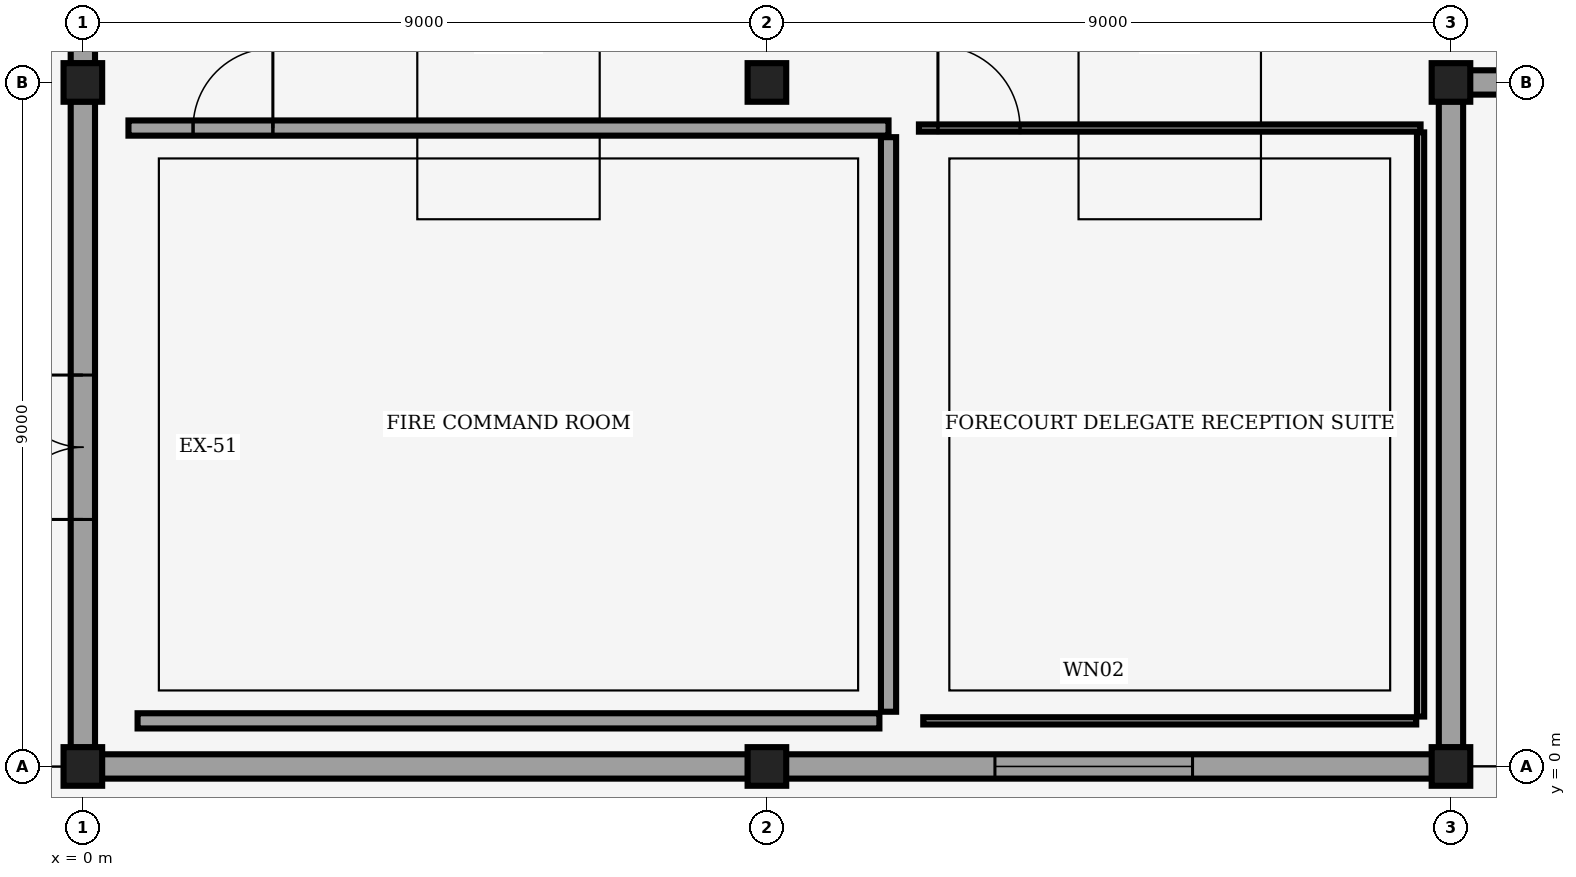
"""IFC4 building model, lengths in metres.
Left out: names, types, materials, properties, quantities, classifications, styles, units other than length and angle.
Written with IfcOpenShell. Run it as: python <this file> out.ifc"""

import sys

from ifc_helpers import new_model, si_unit, direction, frame, frame_2d, origin, origin_2d, place, context, subcontext, project, spatial, rectangle, hollow_circle, extrude, element, fill, save


model = new_model("IFC4")
c1 = context("Model", 3, precision=1e-05, world=origin(), true_north=direction((0.0, 1.0)))
c2 = subcontext(c1, "Body", "Model", "MODEL_VIEW")
j1 = project(units=[si_unit("LENGTHUNIT", "METRE"), si_unit("PLANEANGLEUNIT", "RADIAN")], contexts=[c1])
p1 = place(None, origin())
s1 = spatial("IfcSite", under=j1, at=p1, CompositionType="ELEMENT")
p2 = place(p1, origin())
s2 = spatial("IfcBuilding", under=s1, at=p2, CompositionType="ELEMENT")
p3 = place(p2, origin())
s3 = spatial("IfcBuildingStorey", under=s2, at=p3, CompositionType="ELEMENT", Elevation=0.0)
for number, where, z_axis, x_axis in (
    (1, (0.0, 0.0, 0.0), (0.0, 0.0, 1.0), (1.0, 0.0, 0.0)),
    (2, (0.0, 9.0, 0.0), (0.0, 0.0, 1.0), (1.0, 0.0, 0.0)),
    (3, (9.0, 0.0, 0.0), (0.0, 0.0, 1.0), (1.0, 0.0, 0.0)),
    (4, (9.0, 9.0, 0.0), (0.0, 0.0, 1.0), (1.0, 0.0, 0.0)),
    (5, (18.0, 0.0, 0.0), (0.0, 0.0, 1.0), (1.0, 0.0, 0.0)),
    (6, (18.0, 9.0, 0.0), (0.0, 0.0, 1.0), (1.0, 0.0, 0.0)),
):
    element("IfcColumn", number, at=place(p3, frame(where, z_axis=z_axis, x_axis=x_axis)), inside=s3, PredefinedType="COLUMN", context=c2, shape_type="SweptSolid", body=[
        extrude(hollow_circle(Radius=0.254, WallThickness=0.02, at=origin_2d()), origin(), (0.0, 0.0, 1.0), 6.0),
    ])
p4 = place(p3, frame((18.249, 9.0, 0.0), z_axis=(0.0, 0.0, 1.0), x_axis=(1.0, 0.0, 0.0)))
e7 = element("IfcWall", 7, at=p4, inside=s3, PredefinedType="SOLIDWALL", context=c2, shape_type="SweptSolid", body=[
    extrude(rectangle(XDim=8.502, YDim=0.32, at=frame_2d((4.251, 0.0))), origin(), (0.0, 0.0, 1.0), 4.95),
])
p5 = place(p4, frame((1.401, 0.0, 0.0)))
e8 = element("IfcOpeningElement", 8, at=p5, cuts=e7, PredefinedType="OPENING", context=c2, shape_type="SweptSolid", body=[
    extrude(rectangle(XDim=2.4, YDim=2.45, at=frame_2d((1.2, 1.225))), frame((0.0, 0.17, 0.0), z_axis=(0.0, -1.0, 0.0), x_axis=(1.0, 0.0, 0.0)), (0.0, 0.0, 1.0), 0.34),
])
p6 = place(p4, frame((4.651, 0.0, 0.0)))
e9 = element("IfcOpeningElement", 9, at=p6, cuts=e7, PredefinedType="OPENING", context=c2, shape_type="SweptSolid", body=[
    extrude(rectangle(XDim=2.3, YDim=2.4, at=frame_2d((1.15, 1.2))), frame((0.0, 0.17, 0.0), z_axis=(0.0, -1.0, 0.0), x_axis=(1.0, 0.0, 0.0)), (0.0, 0.0, 1.0), 0.34),
])
p7 = place(p3, frame((0.249, 0.0, 0.0), z_axis=(0.0, 0.0, 1.0), x_axis=(1.0, 0.0, 0.0)))
e10 = element("IfcWall", 10, at=p7, inside=s3, PredefinedType="SOLIDWALL", context=c2, shape_type="SweptSolid", body=[
    extrude(rectangle(XDim=8.502, YDim=0.32, at=frame_2d((4.251, 0.0))), origin(), (0.0, 0.0, 1.0), 4.95),
])
p8 = place(p3, frame((9.249, 0.0, 0.0), z_axis=(0.0, 0.0, 1.0), x_axis=(1.0, 0.0, 0.0)))
e11 = element("IfcWall", 11, at=p8, inside=s3, PredefinedType="SOLIDWALL", context=c2, shape_type="SweptSolid", body=[
    extrude(rectangle(XDim=8.502, YDim=0.32, at=frame_2d((4.251, 0.0))), origin(), (0.0, 0.0, 1.0), 4.95),
])
p9 = place(p8, frame((2.751, 0.0, 0.9)))
e12 = element("IfcOpeningElement", 12, at=p9, cuts=e11, PredefinedType="OPENING", context=c2, shape_type="SweptSolid", body=[
    extrude(rectangle(XDim=2.6, YDim=2.1, at=frame_2d((1.3, 1.05))), frame((0.0, 0.17, 0.0), z_axis=(0.0, -1.0, 0.0), x_axis=(1.0, 0.0, 0.0)), (0.0, 0.0, 1.0), 0.34),
])
p10 = place(p3, frame((18.0, 0.249, 0.0), z_axis=(0.0, 0.0, 1.0), x_axis=(0.0, 1.0, 0.0)))
e13 = element("IfcWall", 13, at=p10, inside=s3, PredefinedType="SOLIDWALL", context=c2, shape_type="SweptSolid", body=[
    extrude(rectangle(XDim=8.502, YDim=0.32, at=frame_2d((4.251, 0.0))), origin(), (0.0, 0.0, 1.0), 4.95),
])
p11 = place(p3, frame((0.0, 0.249, 0.0), z_axis=(0.0, 0.0, 1.0), x_axis=(0.0, 1.0, 0.0)))
e14 = element("IfcWall", 14, at=p11, inside=s3, PredefinedType="SOLIDWALL", context=c2, shape_type="SweptSolid", body=[
    extrude(rectangle(XDim=8.502, YDim=0.32, at=frame_2d((4.251, 0.0))), origin(), (0.0, 0.0, 1.0), 4.95),
])
p12 = place(p11, frame((3.001, 0.0, 0.0)))
e15 = element("IfcOpeningElement", 15, at=p12, cuts=e14, PredefinedType="OPENING", context=c2, shape_type="SweptSolid", body=[
    extrude(rectangle(XDim=1.9, YDim=2.2, at=frame_2d((0.95, 1.1))), frame((0.0, 0.17, 0.0), z_axis=(0.0, -1.0, 0.0), x_axis=(1.0, 0.0, 0.0)), (0.0, 0.0, 1.0), 0.34),
])
p13 = place(p3, frame((0.0, 9.249, 0.0), z_axis=(0.0, 0.0, 1.0), x_axis=(0.0, 1.0, 0.0)))
e16 = element("IfcWall", 16, at=p13, inside=s3, PredefinedType="SOLIDWALL", context=c2, shape_type="SweptSolid", body=[
    extrude(rectangle(XDim=8.306, YDim=0.32, at=frame_2d((4.153, 0.0))), origin(), (0.0, 0.0, 1.0), 4.95),
])
p14 = place(p13, frame((1.701, 0.0, 0.85)))
e17 = element("IfcOpeningElement", 17, at=p14, cuts=e16, PredefinedType="OPENING", context=c2, shape_type="SweptSolid", body=[
    extrude(rectangle(XDim=2.4, YDim=2.1, at=frame_2d((1.2, 1.05))), frame((0.0, 0.17, 0.0), z_axis=(0.0, -1.0, 0.0), x_axis=(1.0, 0.0, 0.0)), (0.0, 0.0, 1.0), 0.34),
])
p15 = place(p13, frame((5.101, 0.0, 0.85)))
e18 = element("IfcOpeningElement", 18, at=p15, cuts=e16, PredefinedType="OPENING", context=c2, shape_type="SweptSolid", body=[
    extrude(rectangle(XDim=2.2, YDim=2.1, at=frame_2d((1.1, 1.05))), frame((0.0, 0.17, 0.0), z_axis=(0.0, -1.0, 0.0), x_axis=(1.0, 0.0, 0.0)), (0.0, 0.0, 1.0), 0.34),
])
p16 = place(p3, frame((0.6, 8.4, 0.0), z_axis=(0.0, 0.0, 1.0), x_axis=(1.0, 0.0, 0.0)))
e19 = element("IfcWall", 19, at=p16, inside=s3, PredefinedType="SOLIDWALL", context=c2, shape_type="SweptSolid", body=[
    extrude(rectangle(XDim=10.0, YDim=0.2, at=frame_2d((5.0, 0.0))), origin(), (0.0, 0.0, 1.0), 4.85),
])
p17 = place(p16, frame((0.85, 0.0, 0.0)))
e20 = element("IfcOpeningElement", 20, at=p17, cuts=e19, PredefinedType="OPENING", context=c2, shape_type="SweptSolid", body=[
    extrude(rectangle(XDim=1.05, YDim=2.15, at=frame_2d((0.525, 1.075))), frame((0.0, 0.11, 0.0), z_axis=(0.0, -1.0, 0.0), x_axis=(1.0, 0.0, 0.0)), (0.0, 0.0, 1.0), 0.22),
])
p18 = place(p3, frame((0.72, 0.6, 0.0), z_axis=(0.0, 0.0, 1.0), x_axis=(1.0, 0.0, 0.0)))
e21 = element("IfcWall", 21, at=p18, inside=s3, PredefinedType="SOLIDWALL", context=c2, shape_type="SweptSolid", body=[
    extrude(rectangle(XDim=9.76, YDim=0.2, at=frame_2d((4.88, 0.0))), origin(), (0.0, 0.0, 1.0), 4.85),
])
p19 = place(p3, frame((10.6, 0.72, 0.0), z_axis=(0.0, 0.0, 1.0), x_axis=(0.0, 1.0, 0.0)))
e22 = element("IfcWall", 22, at=p19, inside=s3, PredefinedType="SOLIDWALL", context=c2, shape_type="SweptSolid", body=[
    extrude(rectangle(XDim=7.56, YDim=0.2, at=frame_2d((3.78, 0.0))), origin(), (0.0, 0.0, 1.0), 4.85),
])
p20 = place(p3, frame((11.0, 8.4, 0.0), z_axis=(0.0, 0.0, 1.0), x_axis=(1.0, 0.0, 0.0)))
e23 = element("IfcWall", 23, at=p20, inside=s3, PredefinedType="PARTITIONING", context=c2, shape_type="SweptSolid", body=[
    extrude(rectangle(XDim=6.6, YDim=0.095, at=frame_2d((3.3, 0.0))), origin(), (0.0, 0.0, 1.0), 4.85),
])
p21 = place(p20, frame((0.25, 0.0, 0.0)))
e24 = element("IfcOpeningElement", 24, at=p21, cuts=e23, PredefinedType="OPENING", context=c2, shape_type="SweptSolid", body=[
    extrude(rectangle(XDim=1.08, YDim=2.18, at=frame_2d((0.54, 1.09))), frame((0.0, 0.057, 0.0), z_axis=(0.0, -1.0, 0.0), x_axis=(1.0, 0.0, 0.0)), (0.0, 0.0, 1.0), 0.115),
])
p22 = place(p3, frame((11.057, 0.6, 0.0), z_axis=(0.0, 0.0, 1.0), x_axis=(1.0, 0.0, 0.0)))
e25 = element("IfcWall", 25, at=p22, inside=s3, PredefinedType="PARTITIONING", context=c2, shape_type="SweptSolid", body=[
    extrude(rectangle(XDim=6.486, YDim=0.095, at=frame_2d((3.243, 0.0))), origin(), (0.0, 0.0, 1.0), 4.85),
])
p23 = place(p3, frame((17.6, 0.657, 0.0), z_axis=(0.0, 0.0, 1.0), x_axis=(0.0, 1.0, 0.0)))
e26 = element("IfcWall", 26, at=p23, inside=s3, PredefinedType="PARTITIONING", context=c2, shape_type="SweptSolid", body=[
    extrude(rectangle(XDim=7.686, YDim=0.095, at=frame_2d((3.843, 0.0))), origin(), (0.0, 0.0, 1.0), 4.85),
])
p24 = place(p9, origin())
e27 = element("IfcWindow", 27, at=p24, inside=s3, PartitioningType="SINGLE_PANEL", PredefinedType="WINDOW", context=c2, shape_type="SweptSolid", body=[
    extrude(rectangle(XDim=2.6, YDim=2.1, at=frame_2d((1.3, 1.05))), frame((0.0, 0.03, 0.0), z_axis=(0.0, -1.0, 0.0), x_axis=(1.0, 0.0, 0.0)), (0.0, 0.0, 1.0), 0.06),
])
fill(e12, e27)
p25 = place(p12, origin())
e28 = element("IfcDoor", 28, at=p25, inside=s3, OperationType="DOUBLE_DOOR_SINGLE_SWING", PredefinedType="DOOR", context=c2, shape_type="SweptSolid", body=[
    extrude(rectangle(XDim=1.9, YDim=2.2, at=frame_2d((0.95, 1.1))), frame((0.0, 0.025, 0.0), z_axis=(0.0, -1.0, 0.0), x_axis=(1.0, 0.0, 0.0)), (0.0, 0.0, 1.0), 0.05),
])
fill(e15, e28)
p26 = place(p17, origin())
e29 = element("IfcDoor", 29, at=p26, inside=s3, OperationType="SINGLE_SWING_RIGHT", PredefinedType="DOOR", context=c2, shape_type="SweptSolid", body=[
    extrude(rectangle(XDim=1.05, YDim=2.15, at=frame_2d((0.525, 1.075))), frame((0.0, 0.025, 0.0), z_axis=(0.0, -1.0, 0.0), x_axis=(1.0, 0.0, 0.0)), (0.0, 0.0, 1.0), 0.05),
])
fill(e20, e29)
p27 = place(p21, origin())
e30 = element("IfcDoor", 30, at=p27, inside=s3, OperationType="SINGLE_SWING_LEFT", PredefinedType="DOOR", context=c2, shape_type="SweptSolid", body=[
    extrude(rectangle(XDim=1.08, YDim=2.18, at=frame_2d((0.54, 1.09))), frame((0.0, 0.025, 0.0), z_axis=(0.0, -1.0, 0.0), x_axis=(1.0, 0.0, 0.0)), (0.0, 0.0, 1.0), 0.05),
])
fill(e24, e30)
save(model, sys.argv[1])
